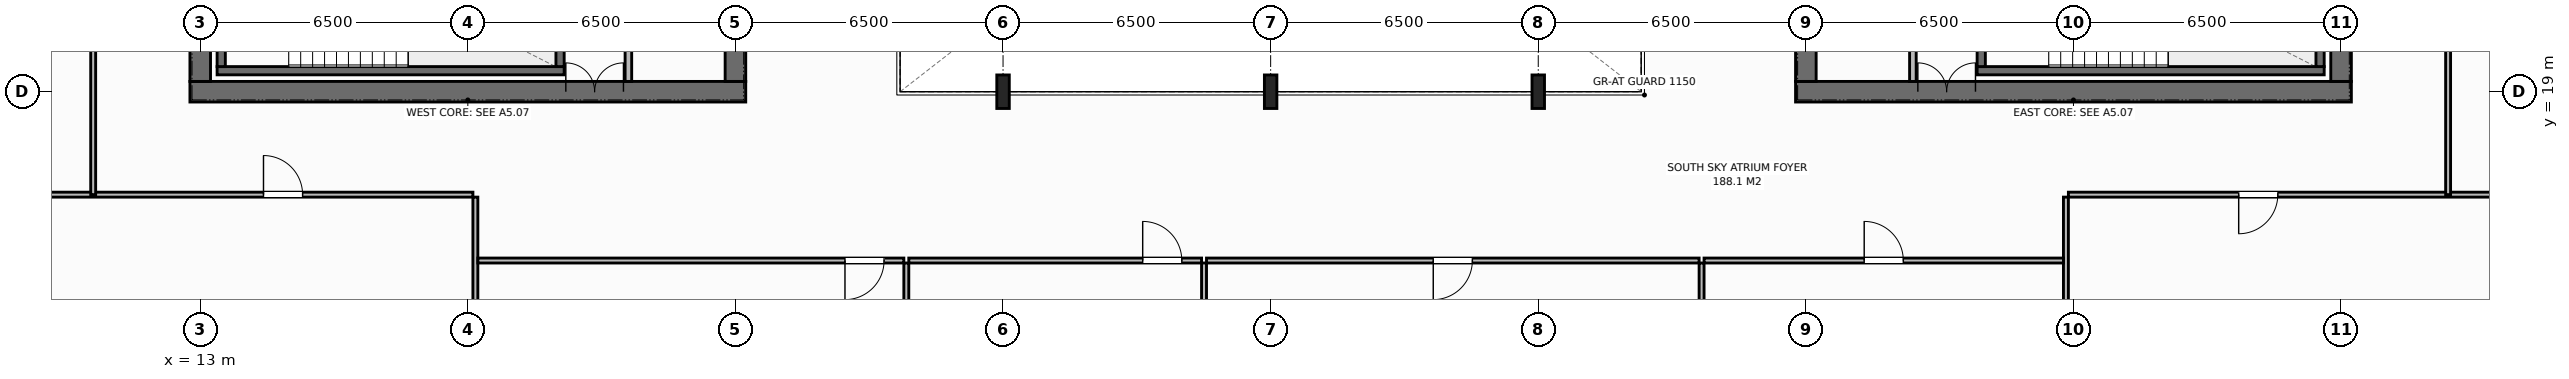
"""IFC4 building model, lengths in metres.
Left out: names, types, materials, properties, quantities, classifications, styles, units other than length and angle.
Written with IfcOpenShell. Run it as: python <this file> out.ifc"""

import sys

from ifc_helpers import new_model, si_unit, direction, frame, frame_2d, origin, origin_2d, place, context, subcontext, project, spatial, rectangle, i_section, extrude, element, fill, save


model = new_model("IFC4")
c1 = context("Model", 3, precision=1e-05, world=origin(), true_north=direction((0.0, 1.0)))
c2 = subcontext(c1, "Body", "Model", "MODEL_VIEW")
j1 = project(units=[si_unit("LENGTHUNIT", "METRE"), si_unit("PLANEANGLEUNIT", "RADIAN")], contexts=[c1])
p1 = place(None, origin())
s1 = spatial("IfcSite", under=j1, at=p1, CompositionType="ELEMENT")
p2 = place(p1, origin())
s2 = spatial("IfcBuilding", under=s1, at=p2, CompositionType="ELEMENT")
p3 = place(p2, frame((0.0, 0.0, 206.2)))
s3 = spatial("IfcBuildingStorey", under=s2, at=p3, CompositionType="ELEMENT", Elevation=206.2)
p4 = place(p3, frame((12.75, 19.0, 0.0), z_axis=(0.0, 0.0, 1.0), x_axis=(1.0, 0.0, 0.0)))
e1 = element("IfcWall", 1, at=p4, inside=s3, PredefinedType="SHEAR", context=c2, shape_type="SweptSolid", body=[
    extrude(rectangle(XDim=13.5, YDim=0.5, at=frame_2d((6.75, 0.0))), origin(), (0.0, 0.0, 1.0), 3.8),
])
p5 = place(p4, frame((9.13, 0.0, 0.0)))
e2 = element("IfcOpeningElement", 2, at=p5, cuts=e1, PredefinedType="OPENING", context=c2, shape_type="SweptSolid", body=[
    extrude(rectangle(XDim=1.4, YDim=2.2, at=frame_2d((0.7, 1.1))), frame((0.0, 0.26, 0.0), z_axis=(0.0, -1.0, 0.0), x_axis=(1.0, 0.0, 0.0)), (0.0, 0.0, 1.0), 0.52),
])
p6 = place(p3, frame((13.0, 19.25, 0.0), z_axis=(0.0, 0.0, 1.0), x_axis=(0.0, 1.0, 0.0)))
e3 = element("IfcWall", 3, at=p6, inside=s3, PredefinedType="SHEAR", context=c2, shape_type="SweptSolid", body=[
    extrude(rectangle(XDim=13.5, YDim=0.5, at=frame_2d((6.75, 0.0))), origin(), (0.0, 0.0, 1.0), 3.8),
])
p7 = place(p6, frame((4.8, 0.0, 0.0)))
e4 = element("IfcOpeningElement", 4, at=p7, cuts=e3, PredefinedType="OPENING", context=c2, shape_type="SweptSolid", body=[
    extrude(rectangle(XDim=1.4, YDim=2.2, at=frame_2d((0.7, 1.1))), frame((0.0, 0.26, 0.0), z_axis=(0.0, -1.0, 0.0), x_axis=(1.0, 0.0, 0.0)), (0.0, 0.0, 1.0), 0.52),
])
p8 = place(p3, frame((26.0, 19.25, 0.0), z_axis=(0.0, 0.0, 1.0), x_axis=(0.0, 1.0, 0.0)))
e5 = element("IfcWall", 5, at=p8, inside=s3, PredefinedType="SHEAR", context=c2, shape_type="SweptSolid", body=[
    extrude(rectangle(XDim=13.5, YDim=0.5, at=frame_2d((6.75, 0.0))), origin(), (0.0, 0.0, 1.0), 3.8),
])
p9 = place(p3, frame((51.75, 19.0, 0.0), z_axis=(0.0, 0.0, 1.0), x_axis=(1.0, 0.0, 0.0)))
e6 = element("IfcWall", 6, at=p9, inside=s3, PredefinedType="SHEAR", context=c2, shape_type="SweptSolid", body=[
    extrude(rectangle(XDim=13.5, YDim=0.5, at=frame_2d((6.75, 0.0))), origin(), (0.0, 0.0, 1.0), 3.8),
])
p10 = place(p9, frame((2.97, 0.0, 0.0)))
e7 = element("IfcOpeningElement", 7, at=p10, cuts=e6, PredefinedType="OPENING", context=c2, shape_type="SweptSolid", body=[
    extrude(rectangle(XDim=1.4, YDim=2.2, at=frame_2d((0.7, 1.1))), frame((0.0, 0.26, 0.0), z_axis=(0.0, -1.0, 0.0), x_axis=(1.0, 0.0, 0.0)), (0.0, 0.0, 1.0), 0.52),
])
p11 = place(p3, frame((52.0, 19.25, 0.0), z_axis=(0.0, 0.0, 1.0), x_axis=(0.0, 1.0, 0.0)))
e8 = element("IfcWall", 8, at=p11, inside=s3, PredefinedType="SHEAR", context=c2, shape_type="SweptSolid", body=[
    extrude(rectangle(XDim=13.5, YDim=0.5, at=frame_2d((6.75, 0.0))), origin(), (0.0, 0.0, 1.0), 3.8),
])
p12 = place(p3, frame((65.0, 19.25, 0.0), z_axis=(0.0, 0.0, 1.0), x_axis=(0.0, 1.0, 0.0)))
e9 = element("IfcWall", 9, at=p12, inside=s3, PredefinedType="SHEAR", context=c2, shape_type="SweptSolid", body=[
    extrude(rectangle(XDim=13.5, YDim=0.5, at=frame_2d((6.75, 0.0))), origin(), (0.0, 0.0, 1.0), 3.8),
])
p13 = place(p12, frame((8.2, 0.0, 0.0)))
e10 = element("IfcOpeningElement", 10, at=p13, cuts=e9, PredefinedType="OPENING", context=c2, shape_type="SweptSolid", body=[
    extrude(rectangle(XDim=1.3, YDim=2.2, at=frame_2d((0.65, 1.1))), frame((0.0, 0.26, 0.0), z_axis=(0.0, -1.0, 0.0), x_axis=(1.0, 0.0, 0.0)), (0.0, 0.0, 1.0), 0.52),
])
p14 = place(p3, frame((13.41, 19.51, 0.0), z_axis=(0.0, 0.0, 1.0), x_axis=(1.0, 0.0, 0.0)))
e11 = element("IfcWall", 11, at=p14, inside=s3, PredefinedType="SHEAR", context=c2, shape_type="SweptSolid", body=[
    extrude(rectangle(XDim=8.43, YDim=0.2, at=frame_2d((4.215, 0.0))), origin(), (0.0, 0.0, 1.0), 3.8),
])
for number, where, z_axis, x_axis in (
    (12, (13.51, 19.61, 0.0), (0.0, 0.0, 1.0), (0.0, 1.0, 0.0)),
    (13, (21.74, 19.61, 0.0), (0.0, 0.0, 1.0), (0.0, 1.0, 0.0)),
):
    element("IfcWall", number, at=place(p3, frame(where, z_axis=z_axis, x_axis=x_axis)), inside=s3, PredefinedType="SHEAR", context=c2, shape_type="SweptSolid", body=[
        extrude(rectangle(XDim=3.28, YDim=0.2, at=frame_2d((1.64, 0.0))), origin(), (0.0, 0.0, 1.0), 3.8),
    ])
p15 = place(p3, frame((56.16, 19.51, 0.0), z_axis=(0.0, 0.0, 1.0), x_axis=(1.0, 0.0, 0.0)))
e14 = element("IfcWall", 14, at=p15, inside=s3, PredefinedType="SHEAR", context=c2, shape_type="SweptSolid", body=[
    extrude(rectangle(XDim=8.43, YDim=0.2, at=frame_2d((4.215, 0.0))), origin(), (0.0, 0.0, 1.0), 3.8),
])
for number, where, z_axis, x_axis in (
    (15, (56.26, 19.61, 0.0), (0.0, 0.0, 1.0), (0.0, 1.0, 0.0)),
    (16, (64.49, 19.61, 0.0), (0.0, 0.0, 1.0), (0.0, 1.0, 0.0)),
):
    element("IfcWall", number, at=place(p3, frame(where, z_axis=z_axis, x_axis=x_axis)), inside=s3, PredefinedType="SHEAR", context=c2, shape_type="SweptSolid", body=[
        extrude(rectangle(XDim=3.28, YDim=0.2, at=frame_2d((1.64, 0.0))), origin(), (0.0, 0.0, 1.0), 3.8),
    ])
for number, where, z_axis, x_axis in (
    (17, (32.5, 19.0, 0.0), (0.0, 0.0, 1.0), (1.0, 0.0, 0.0)),
    (18, (39.0, 19.0, 0.0), (0.0, 0.0, 1.0), (1.0, 0.0, 0.0)),
    (19, (45.5, 19.0, 0.0), (0.0, 0.0, 1.0), (1.0, 0.0, 0.0)),
):
    element("IfcColumn", number, at=place(p3, frame(where, z_axis=z_axis, x_axis=x_axis)), inside=s3, PredefinedType="COLUMN", context=c2, shape_type="SweptSolid", body=[
        extrude(i_section(OverallWidth=0.303, OverallDepth=0.814, WebThickness=0.021, FlangeThickness=0.04, at=origin_2d()), origin(), (0.0, 0.0, 1.0), 3.8),
    ])
p16 = place(p3, frame((23.4, 19.25, 0.0), z_axis=(0.0, 0.0, 1.0), x_axis=(0.0, 1.0, 0.0)))
e20 = element("IfcWall", 20, at=p16, inside=s3, PredefinedType="STANDARD", context=c2, shape_type="SweptSolid", body=[
    extrude(rectangle(XDim=13.5, YDim=0.16, at=frame_2d((6.75, 0.0))), origin(), (0.0, 0.0, 1.0), 3.58),
])
p17 = place(p16, frame((2.25, 0.0, 0.0)))
e21 = element("IfcOpeningElement", 21, at=p17, cuts=e20, PredefinedType="OPENING", context=c2, shape_type="SweptSolid", body=[
    extrude(rectangle(XDim=0.95, YDim=2.15, at=frame_2d((0.475, 1.075))), frame((0.0, 0.09, 0.0), z_axis=(0.0, -1.0, 0.0), x_axis=(1.0, 0.0, 0.0)), (0.0, 0.0, 1.0), 0.18),
])
p18 = place(p16, frame((6.35, 0.0, 0.0)))
e22 = element("IfcOpeningElement", 22, at=p18, cuts=e20, PredefinedType="OPENING", context=c2, shape_type="SweptSolid", body=[
    extrude(rectangle(XDim=0.95, YDim=2.15, at=frame_2d((0.475, 1.075))), frame((0.0, 0.09, 0.0), z_axis=(0.0, -1.0, 0.0), x_axis=(1.0, 0.0, 0.0)), (0.0, 0.0, 1.0), 0.18),
])
p19 = place(p16, frame((9.35, 0.0, 0.0)))
e23 = element("IfcOpeningElement", 23, at=p19, cuts=e20, PredefinedType="OPENING", context=c2, shape_type="SweptSolid", body=[
    extrude(rectangle(XDim=1.1, YDim=2.2, at=frame_2d((0.55, 1.1))), frame((0.0, 0.09, 0.0), z_axis=(0.0, -1.0, 0.0), x_axis=(1.0, 0.0, 0.0)), (0.0, 0.0, 1.0), 0.18),
])
p20 = place(p16, frame((11.55, 0.0, 0.0)))
e24 = element("IfcOpeningElement", 24, at=p20, cuts=e20, PredefinedType="OPENING", context=c2, shape_type="SweptSolid", body=[
    extrude(rectangle(XDim=1.1, YDim=2.2, at=frame_2d((0.55, 1.1))), frame((0.0, 0.09, 0.0), z_axis=(0.0, -1.0, 0.0), x_axis=(1.0, 0.0, 0.0)), (0.0, 0.0, 1.0), 0.18),
])
p21 = place(p3, frame((54.6, 19.25, 0.0), z_axis=(0.0, 0.0, 1.0), x_axis=(0.0, 1.0, 0.0)))
e25 = element("IfcWall", 25, at=p21, inside=s3, PredefinedType="STANDARD", context=c2, shape_type="SweptSolid", body=[
    extrude(rectangle(XDim=13.5, YDim=0.16, at=frame_2d((6.75, 0.0))), origin(), (0.0, 0.0, 1.0), 3.58),
])
p22 = place(p21, frame((2.15, 0.0, 0.0)))
e26 = element("IfcOpeningElement", 26, at=p22, cuts=e25, PredefinedType="OPENING", context=c2, shape_type="SweptSolid", body=[
    extrude(rectangle(XDim=0.95, YDim=2.15, at=frame_2d((0.475, 1.075))), frame((0.0, 0.09, 0.0), z_axis=(0.0, -1.0, 0.0), x_axis=(1.0, 0.0, 0.0)), (0.0, 0.0, 1.0), 0.18),
])
p23 = place(p21, frame((6.25, 0.0, 0.0)))
e27 = element("IfcOpeningElement", 27, at=p23, cuts=e25, PredefinedType="OPENING", context=c2, shape_type="SweptSolid", body=[
    extrude(rectangle(XDim=0.95, YDim=2.15, at=frame_2d((0.475, 1.075))), frame((0.0, 0.09, 0.0), z_axis=(0.0, -1.0, 0.0), x_axis=(1.0, 0.0, 0.0)), (0.0, 0.0, 1.0), 0.18),
])
p24 = place(p21, frame((9.35, 0.0, 0.0)))
e28 = element("IfcOpeningElement", 28, at=p24, cuts=e25, PredefinedType="OPENING", context=c2, shape_type="SweptSolid", body=[
    extrude(rectangle(XDim=1.1, YDim=2.2, at=frame_2d((0.55, 1.1))), frame((0.0, 0.09, 0.0), z_axis=(0.0, -1.0, 0.0), x_axis=(1.0, 0.0, 0.0)), (0.0, 0.0, 1.0), 0.18),
])
p25 = place(p21, frame((11.55, 0.0, 0.0)))
e29 = element("IfcOpeningElement", 29, at=p25, cuts=e25, PredefinedType="OPENING", context=c2, shape_type="SweptSolid", body=[
    extrude(rectangle(XDim=1.1, YDim=2.2, at=frame_2d((0.55, 1.1))), frame((0.0, 0.09, 0.0), z_axis=(0.0, -1.0, 0.0), x_axis=(1.0, 0.0, 0.0)), (0.0, 0.0, 1.0), 0.18),
])
p26 = place(p3, frame((19.683, 5.02, 0.0), z_axis=(0.0, 0.0, 1.0), x_axis=(0.0, 1.0, 0.0)))
e30 = element("IfcWall", 30, at=p26, inside=s3, PredefinedType="PARTITIONING", context=c2, shape_type="SweptSolid", body=[
    extrude(rectangle(XDim=11.42, YDim=0.12, at=frame_2d((5.71, 0.0))), origin(), (0.0, 0.0, 1.0), 2.88),
])
p27 = place(p3, frame((5.98, 16.5, 0.0), z_axis=(0.0, 0.0, 1.0), x_axis=(1.0, 0.0, 0.0)))
e31 = element("IfcWall", 31, at=p27, inside=s3, PredefinedType="PARTITIONING", context=c2, shape_type="SweptSolid", body=[
    extrude(rectangle(XDim=13.643, YDim=0.12, at=frame_2d((6.822, 0.0))), origin(), (0.0, 0.0, 1.0), 3.58),
])
p28 = place(p27, frame((8.557, 0.0, 0.0)))
e32 = element("IfcOpeningElement", 32, at=p28, cuts=e31, PredefinedType="OPENING", context=c2, shape_type="SweptSolid", body=[
    extrude(rectangle(XDim=0.95, YDim=2.15, at=frame_2d((0.475, 1.075))), frame((0.0, 0.07, 0.0), z_axis=(0.0, -1.0, 0.0), x_axis=(1.0, 0.0, 0.0)), (0.0, 0.0, 1.0), 0.14),
])
p29 = place(p3, frame((30.151, 5.02, 0.0), z_axis=(0.0, 0.0, 1.0), x_axis=(0.0, 1.0, 0.0)))
e33 = element("IfcWall", 33, at=p29, inside=s3, PredefinedType="PARTITIONING", context=c2, shape_type="SweptSolid", body=[
    extrude(rectangle(XDim=9.82, YDim=0.12, at=frame_2d((4.91, 0.0))), origin(), (0.0, 0.0, 1.0), 3.58),
])
p30 = place(p3, frame((19.743, 14.9, 0.0), z_axis=(0.0, 0.0, 1.0), x_axis=(1.0, 0.0, 0.0)))
e34 = element("IfcWall", 34, at=p30, inside=s3, PredefinedType="PARTITIONING", context=c2, shape_type="SweptSolid", body=[
    extrude(rectangle(XDim=10.347, YDim=0.12, at=frame_2d((5.174, 0.0))), origin(), (0.0, 0.0, 1.0), 3.58),
])
p31 = place(p30, frame((8.917, 0.0, 0.0)))
e35 = element("IfcOpeningElement", 35, at=p31, cuts=e34, PredefinedType="OPENING", context=c2, shape_type="SweptSolid", body=[
    extrude(rectangle(XDim=0.95, YDim=2.15, at=frame_2d((0.475, 1.075))), frame((0.0, 0.07, 0.0), z_axis=(0.0, -1.0, 0.0), x_axis=(1.0, 0.0, 0.0)), (0.0, 0.0, 1.0), 0.14),
])
p32 = place(p3, frame((37.382, 5.02, 0.0), z_axis=(0.0, 0.0, 1.0), x_axis=(0.0, 1.0, 0.0)))
e36 = element("IfcWall", 36, at=p32, inside=s3, PredefinedType="PARTITIONING", context=c2, shape_type="SweptSolid", body=[
    extrude(rectangle(XDim=9.82, YDim=0.12, at=frame_2d((4.91, 0.0))), origin(), (0.0, 0.0, 1.0), 3.58),
])
p33 = place(p3, frame((30.211, 14.9, 0.0), z_axis=(0.0, 0.0, 1.0), x_axis=(1.0, 0.0, 0.0)))
e37 = element("IfcWall", 37, at=p33, inside=s3, PredefinedType="PARTITIONING", context=c2, shape_type="SweptSolid", body=[
    extrude(rectangle(XDim=7.111, YDim=0.12, at=frame_2d((3.556, 0.0))), origin(), (0.0, 0.0, 1.0), 3.58),
])
p34 = place(p33, frame((5.681, 0.0, 0.0)))
e38 = element("IfcOpeningElement", 38, at=p34, cuts=e37, PredefinedType="OPENING", context=c2, shape_type="SweptSolid", body=[
    extrude(rectangle(XDim=0.95, YDim=2.15, at=frame_2d((0.475, 1.075))), frame((0.0, 0.07, 0.0), z_axis=(0.0, -1.0, 0.0), x_axis=(1.0, 0.0, 0.0)), (0.0, 0.0, 1.0), 0.14),
])
p35 = place(p3, frame((49.467, 5.02, 0.0), z_axis=(0.0, 0.0, 1.0), x_axis=(0.0, 1.0, 0.0)))
e39 = element("IfcWall", 39, at=p35, inside=s3, PredefinedType="PARTITIONING", context=c2, shape_type="SweptSolid", body=[
    extrude(rectangle(XDim=9.82, YDim=0.12, at=frame_2d((4.91, 0.0))), origin(), (0.0, 0.0, 1.0), 3.58),
])
p36 = place(p3, frame((37.442, 14.9, 0.0), z_axis=(0.0, 0.0, 1.0), x_axis=(1.0, 0.0, 0.0)))
e40 = element("IfcWall", 40, at=p36, inside=s3, PredefinedType="PARTITIONING", context=c2, shape_type="SweptSolid", body=[
    extrude(rectangle(XDim=11.965, YDim=0.12, at=frame_2d((5.983, 0.0))), origin(), (0.0, 0.0, 1.0), 3.58),
])
p37 = place(p36, frame((5.508, 0.0, 0.0)))
e41 = element("IfcOpeningElement", 41, at=p37, cuts=e40, PredefinedType="OPENING", context=c2, shape_type="SweptSolid", body=[
    extrude(rectangle(XDim=0.95, YDim=2.15, at=frame_2d((0.475, 1.075))), frame((0.0, 0.07, 0.0), z_axis=(0.0, -1.0, 0.0), x_axis=(1.0, 0.0, 0.0)), (0.0, 0.0, 1.0), 0.14),
])
p38 = place(p3, frame((58.317, 5.02, 0.0), z_axis=(0.0, 0.0, 1.0), x_axis=(0.0, 1.0, 0.0)))
e42 = element("IfcWall", 42, at=p38, inside=s3, PredefinedType="PARTITIONING", context=c2, shape_type="SweptSolid", body=[
    extrude(rectangle(XDim=11.42, YDim=0.12, at=frame_2d((5.71, 0.0))), origin(), (0.0, 0.0, 1.0), 2.88),
])
p39 = place(p3, frame((49.527, 14.9, 0.0), z_axis=(0.0, 0.0, 1.0), x_axis=(1.0, 0.0, 0.0)))
e43 = element("IfcWall", 43, at=p39, inside=s3, PredefinedType="PARTITIONING", context=c2, shape_type="SweptSolid", body=[
    extrude(rectangle(XDim=8.729, YDim=0.12, at=frame_2d((4.365, 0.0))), origin(), (0.0, 0.0, 1.0), 3.58),
])
p40 = place(p39, frame((3.89, 0.0, 0.0)))
e44 = element("IfcOpeningElement", 44, at=p40, cuts=e43, PredefinedType="OPENING", context=c2, shape_type="SweptSolid", body=[
    extrude(rectangle(XDim=0.95, YDim=2.15, at=frame_2d((0.475, 1.075))), frame((0.0, 0.07, 0.0), z_axis=(0.0, -1.0, 0.0), x_axis=(1.0, 0.0, 0.0)), (0.0, 0.0, 1.0), 0.14),
])
p41 = place(p3, frame((58.377, 16.5, 0.0), z_axis=(0.0, 0.0, 1.0), x_axis=(1.0, 0.0, 0.0)))
e45 = element("IfcWall", 45, at=p41, inside=s3, PredefinedType="PARTITIONING", context=c2, shape_type="SweptSolid", body=[
    extrude(rectangle(XDim=13.643, YDim=0.12, at=frame_2d((6.822, 0.0))), origin(), (0.0, 0.0, 1.0), 3.58),
])
p42 = place(p41, frame((4.137, 0.0, 0.0)))
e46 = element("IfcOpeningElement", 46, at=p42, cuts=e45, PredefinedType="OPENING", context=c2, shape_type="SweptSolid", body=[
    extrude(rectangle(XDim=0.95, YDim=2.15, at=frame_2d((0.475, 1.075))), frame((0.0, 0.07, 0.0), z_axis=(0.0, -1.0, 0.0), x_axis=(1.0, 0.0, 0.0)), (0.0, 0.0, 1.0), 0.14),
])
p43 = place(p3, frame((10.4, 16.5, 0.0), z_axis=(0.0, 0.0, 1.0), x_axis=(0.0, 1.0, 0.0)))
e47 = element("IfcWall", 47, at=p43, inside=s3, PredefinedType="PARTITIONING", context=c2, shape_type="SweptSolid", body=[
    extrude(rectangle(XDim=19.0, YDim=0.12, at=frame_2d((9.5, 0.0))), origin(), (0.0, 0.0, 1.0), 3.58),
])
p44 = place(p43, frame((9.025, 0.0, 0.0)))
e48 = element("IfcOpeningElement", 48, at=p44, cuts=e47, PredefinedType="OPENING", context=c2, shape_type="SweptSolid", body=[
    extrude(rectangle(XDim=0.95, YDim=2.15, at=frame_2d((0.475, 1.075))), frame((0.0, 0.07, 0.0), z_axis=(0.0, -1.0, 0.0), x_axis=(1.0, 0.0, 0.0)), (0.0, 0.0, 1.0), 0.14),
])
p45 = place(p3, frame((67.6, 16.5, 0.0), z_axis=(0.0, 0.0, 1.0), x_axis=(0.0, 1.0, 0.0)))
e49 = element("IfcWall", 49, at=p45, inside=s3, PredefinedType="PARTITIONING", context=c2, shape_type="SweptSolid", body=[
    extrude(rectangle(XDim=9.5, YDim=0.12, at=frame_2d((4.75, 0.0))), origin(), (0.0, 0.0, 1.0), 3.58),
])
p46 = place(p45, frame((5.325, 0.0, 0.0)))
e50 = element("IfcOpeningElement", 50, at=p46, cuts=e49, PredefinedType="OPENING", context=c2, shape_type="SweptSolid", body=[
    extrude(rectangle(XDim=0.95, YDim=2.15, at=frame_2d((0.475, 1.075))), frame((0.0, 0.07, 0.0), z_axis=(0.0, -1.0, 0.0), x_axis=(1.0, 0.0, 0.0)), (0.0, 0.0, 1.0), 0.14),
])
p47 = place(p5, origin())
e51 = element("IfcDoor", 51, at=p47, inside=s3, OperationType="DOUBLE_DOOR_SINGLE_SWING", PredefinedType="DOOR", context=c2, shape_type="SweptSolid", body=[
    extrude(rectangle(XDim=1.4, YDim=2.2, at=frame_2d((0.7, 1.1))), frame((0.0, 0.075, 0.0), z_axis=(0.0, -1.0, 0.0), x_axis=(1.0, 0.0, 0.0)), (0.0, 0.0, 1.0), 0.05),
])
fill(e2, e51)
p48 = place(p10, origin())
e52 = element("IfcDoor", 52, at=p48, inside=s3, OperationType="DOUBLE_DOOR_SINGLE_SWING", PredefinedType="DOOR", context=c2, shape_type="SweptSolid", body=[
    extrude(rectangle(XDim=1.4, YDim=2.2, at=frame_2d((0.7, 1.1))), frame((0.0, 0.075, 0.0), z_axis=(0.0, -1.0, 0.0), x_axis=(1.0, 0.0, 0.0)), (0.0, 0.0, 1.0), 0.05),
])
fill(e7, e52)
p49 = place(p28, origin())
e53 = element("IfcDoor", 53, at=p49, inside=s3, OperationType="SINGLE_SWING_LEFT", PredefinedType="DOOR", context=c2, shape_type="SweptSolid", body=[
    extrude(rectangle(XDim=0.95, YDim=2.15, at=frame_2d((0.475, 1.075))), frame((0.0, 0.025, 0.0), z_axis=(0.0, -1.0, 0.0), x_axis=(1.0, 0.0, 0.0)), (0.0, 0.0, 1.0), 0.05),
])
fill(e32, e53)
p50 = place(p31, origin())
e54 = element("IfcDoor", 54, at=p50, inside=s3, OperationType="SINGLE_SWING_RIGHT", PredefinedType="DOOR", context=c2, shape_type="SweptSolid", body=[
    extrude(rectangle(XDim=0.95, YDim=2.15, at=frame_2d((0.475, 1.075))), frame((0.0, 0.025, 0.0), z_axis=(0.0, -1.0, 0.0), x_axis=(1.0, 0.0, 0.0)), (0.0, 0.0, 1.0), 0.05),
])
fill(e35, e54)
p51 = place(p34, origin())
e55 = element("IfcDoor", 55, at=p51, inside=s3, OperationType="SINGLE_SWING_LEFT", PredefinedType="DOOR", context=c2, shape_type="SweptSolid", body=[
    extrude(rectangle(XDim=0.95, YDim=2.15, at=frame_2d((0.475, 1.075))), frame((0.0, 0.025, 0.0), z_axis=(0.0, -1.0, 0.0), x_axis=(1.0, 0.0, 0.0)), (0.0, 0.0, 1.0), 0.05),
])
fill(e38, e55)
p52 = place(p37, origin())
e56 = element("IfcDoor", 56, at=p52, inside=s3, OperationType="SINGLE_SWING_RIGHT", PredefinedType="DOOR", context=c2, shape_type="SweptSolid", body=[
    extrude(rectangle(XDim=0.95, YDim=2.15, at=frame_2d((0.475, 1.075))), frame((0.0, 0.025, 0.0), z_axis=(0.0, -1.0, 0.0), x_axis=(1.0, 0.0, 0.0)), (0.0, 0.0, 1.0), 0.05),
])
fill(e41, e56)
p53 = place(p40, origin())
e57 = element("IfcDoor", 57, at=p53, inside=s3, OperationType="SINGLE_SWING_LEFT", PredefinedType="DOOR", context=c2, shape_type="SweptSolid", body=[
    extrude(rectangle(XDim=0.95, YDim=2.15, at=frame_2d((0.475, 1.075))), frame((0.0, 0.025, 0.0), z_axis=(0.0, -1.0, 0.0), x_axis=(1.0, 0.0, 0.0)), (0.0, 0.0, 1.0), 0.05),
])
fill(e44, e57)
p54 = place(p42, origin())
e58 = element("IfcDoor", 58, at=p54, inside=s3, OperationType="SINGLE_SWING_RIGHT", PredefinedType="DOOR", context=c2, shape_type="SweptSolid", body=[
    extrude(rectangle(XDim=0.95, YDim=2.15, at=frame_2d((0.475, 1.075))), frame((0.0, 0.025, 0.0), z_axis=(0.0, -1.0, 0.0), x_axis=(1.0, 0.0, 0.0)), (0.0, 0.0, 1.0), 0.05),
])
fill(e46, e58)
save(model, sys.argv[1])
